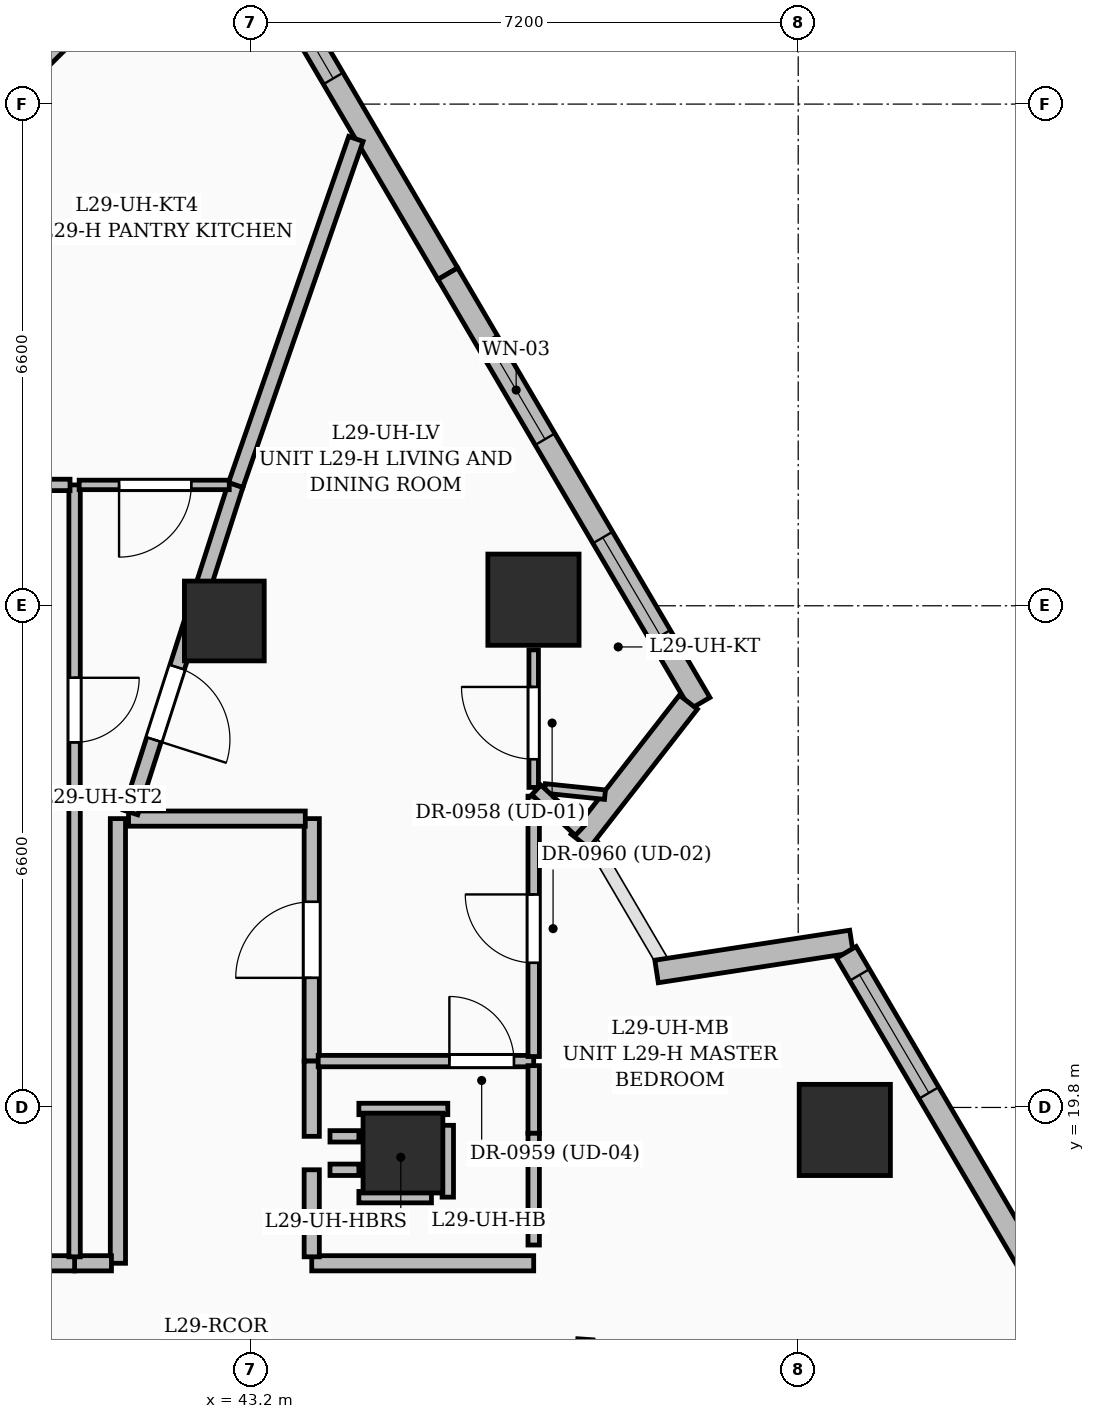
"""IFC4 building model, lengths in metres.
Left out: names, types, materials, properties, quantities, classifications, styles, units other than length and angle.
Written with IfcOpenShell. Run it as: python <this file> out.ifc"""

import sys

from ifc_helpers import new_model, si_unit, direction, frame, frame_2d, origin, origin_2d, place, context, subcontext, project, spatial, rectangle, extrude, element, fill, save


model = new_model("IFC4")
c1 = context("Model", 3, precision=1e-05, world=origin(), true_north=direction((0.0, 1.0)))
c2 = subcontext(c1, "Body", "Model", "MODEL_VIEW")
j1 = project(units=[si_unit("LENGTHUNIT", "METRE"), si_unit("PLANEANGLEUNIT", "RADIAN")], contexts=[c1])
p1 = place(None, origin())
s1 = spatial("IfcSite", under=j1, at=p1, CompositionType="ELEMENT")
p2 = place(p1, origin())
s2 = spatial("IfcBuilding", under=s1, at=p2, CompositionType="ELEMENT")
p3 = place(p2, frame((0.0, 0.0, 117.6)))
s3 = spatial("IfcBuildingStorey", under=s2, at=p3, CompositionType="ELEMENT", Elevation=117.6)
for number, where, z_axis, x_axis in (
    (1, (45.2, 19.2, 0.0), (0.0, 0.0, 1.0), (1.0, 0.0, 0.0)),
    (2, (42.85, 26.2, 0.0), (0.0, 0.0, 1.0), (1.0, 0.0, 0.0)),
):
    element("IfcColumn", number, at=place(p3, frame(where, z_axis=z_axis, x_axis=x_axis)), inside=s3, PredefinedType="COLUMN", context=c2, shape_type="SweptSolid", body=[
        extrude(rectangle(XDim=1.05, YDim=1.05, at=origin_2d()), origin(), (0.0, 0.0, 1.0), 3.6),
    ])
for number, where, z_axis, x_axis in (
    (3, (51.013, 19.504, 0.0), (0.0, 0.0, 1.0), (1.0, 0.0, 0.0)),
    (4, (46.917, 26.48, 0.0), (0.0, 0.0, 1.0), (1.0, 0.0, 0.0)),
):
    element("IfcColumn", number, at=place(p3, frame(where, z_axis=z_axis, x_axis=x_axis)), inside=s3, PredefinedType="COLUMN", context=c2, shape_type="SweptSolid", body=[
        extrude(rectangle(XDim=1.2, YDim=1.2, at=origin_2d()), origin(), (0.0, 0.0, 1.0), 3.6),
    ])
p4 = place(p3, frame((42.472, 36.42, 0.0), z_axis=(0.0, 0.0, 1.0), x_axis=(0.506315009763, -0.86234860172, 0.0)))
e5 = element("IfcWall", 5, at=p4, inside=s3, PredefinedType="SOLIDWALL", context=c2, shape_type="SweptSolid", body=[
    extrude(rectangle(XDim=6.553, YDim=0.3, at=frame_2d((3.277, 0.0))), origin(), (0.0, 0.0, 1.0), 3.35),
])
p5 = place(p4, frame((1.975, 0.0, 0.55)))
e6 = element("IfcOpeningElement", 6, at=p5, cuts=e5, PredefinedType="OPENING", context=c2, shape_type="SweptSolid", body=[
    extrude(rectangle(XDim=1.6, YDim=2.2, at=frame_2d((0.8, 1.1))), frame((0.0, 0.16, 0.0), z_axis=(0.0, -1.0, 0.0), x_axis=(1.0, 0.0, 0.0)), (0.0, 0.0, 1.0), 0.32),
])
p6 = place(p3, frame((45.791, 30.769, 0.0), z_axis=(0.0, 0.0, 1.0), x_axis=(0.506326446954, -0.862341886443, 0.0)))
e7 = element("IfcWall", 7, at=p6, inside=s3, PredefinedType="SOLIDWALL", context=c2, shape_type="SweptSolid", body=[
    extrude(rectangle(XDim=6.554, YDim=0.3, at=frame_2d((3.277, 0.0))), origin(), (0.0, 0.0, 1.0), 3.35),
])
p7 = place(p6, frame((1.025, 0.0, 0.6)))
e8 = element("IfcOpeningElement", 8, at=p7, cuts=e7, PredefinedType="OPENING", context=c2, shape_type="SweptSolid", body=[
    extrude(rectangle(XDim=1.5, YDim=2.1, at=frame_2d((0.75, 1.05))), frame((0.0, 0.16, 0.0), z_axis=(0.0, -1.0, 0.0), x_axis=(1.0, 0.0, 0.0)), (0.0, 0.0, 1.0), 0.32),
])
p8 = place(p6, frame((4.025, 0.0, 0.6)))
e9 = element("IfcOpeningElement", 9, at=p8, cuts=e7, PredefinedType="OPENING", context=c2, shape_type="SweptSolid", body=[
    extrude(rectangle(XDim=1.5, YDim=2.1, at=frame_2d((0.75, 1.05))), frame((0.0, 0.16, 0.0), z_axis=(0.0, -1.0, 0.0), x_axis=(1.0, 0.0, 0.0)), (0.0, 0.0, 1.0), 0.32),
])
p9 = place(p3, frame((48.955, 25.132, 0.0), z_axis=(0.0, 0.0, 1.0), x_axis=(-0.614326980446, -0.789051557946, 0.0)))
e10 = element("IfcWall", 10, at=p9, inside=s3, PredefinedType="SOLIDWALL", context=c2, shape_type="SweptSolid", body=[
    extrude(rectangle(XDim=2.318, YDim=0.3, at=frame_2d((1.159, 0.0))), origin(), (0.0, 0.0, 1.0), 2.575),
])
p10 = place(p3, frame((48.537, 21.589, 0.0), z_axis=(0.0, 0.0, 1.0), x_axis=(0.988351014823, 0.152191561848, 0.0)))
e11 = element("IfcWall", 11, at=p10, inside=s3, PredefinedType="SOLIDWALL", context=c2, shape_type="SweptSolid", body=[
    extrude(rectangle(XDim=2.594, YDim=0.3, at=frame_2d((1.297, 0.0))), origin(), (0.0, 0.0, 1.0), 2.575),
])
p11 = place(p3, frame((51.033, 21.841, 0.0), z_axis=(0.0, 0.0, 1.0), x_axis=(0.506317595085, -0.862347083782, 0.0)))
e12 = element("IfcWall", 12, at=p11, inside=s3, PredefinedType="SOLIDWALL", context=c2, shape_type="SweptSolid", body=[
    extrude(rectangle(XDim=6.274, YDim=0.3, at=frame_2d((3.137, 0.0))), origin(), (0.0, 0.0, 1.0), 3.35),
])
p12 = place(p11, frame((0.345, 0.0, 0.6)))
e13 = element("IfcOpeningElement", 13, at=p12, cuts=e12, PredefinedType="OPENING", context=c2, shape_type="SweptSolid", body=[
    extrude(rectangle(XDim=1.8, YDim=2.1, at=frame_2d((0.9, 1.05))), frame((0.0, 0.16, 0.0), z_axis=(0.0, -1.0, 0.0), x_axis=(1.0, 0.0, 0.0)), (0.0, 0.0, 1.0), 0.32),
])
p13 = place(p3, frame((47.425, 14.2, 0.0), z_axis=(0.0, 0.0, 1.0), x_axis=(0.068484119878, 0.997652206595, 0.0)))
e14 = element("IfcWall", 14, at=p13, inside=s3, PredefinedType="PARTITIONING", context=c2, shape_type="SweptSolid", body=[
    extrude(rectangle(XDim=2.556, YDim=0.2, at=frame_2d((1.278, 0.0))), origin(), (0.0, 0.0, 1.0), 2.372),
])
p14 = place(p3, frame((44.0, 20.41, 0.0), z_axis=(0.0, 0.0, 1.0), x_axis=(0.0, 1.0, 0.0)))
e15 = element("IfcWall", 15, at=p14, inside=s3, PredefinedType="PARTITIONING", context=c2, shape_type="SweptSolid", body=[
    extrude(rectangle(XDim=3.19, YDim=0.2, at=frame_2d((1.595, 0.0))), origin(), (0.0, 0.0, 1.0), 2.436),
])
p15 = place(p14, frame((1.095, 0.0, 0.0)))
e16 = element("IfcOpeningElement", 16, at=p15, cuts=e15, PredefinedType="OPENING", context=c2, shape_type="SweptSolid", body=[
    extrude(rectangle(XDim=1.0, YDim=2.2, at=frame_2d((0.5, 1.1))), frame((0.0, 0.11, 0.0), z_axis=(0.0, -1.0, 0.0), x_axis=(1.0, 0.0, 0.0)), (0.0, 0.0, 1.0), 0.22),
])
p16 = place(p3, frame((43.915, 23.6, 0.0), z_axis=(0.0, 0.0, 1.0), x_axis=(-1.0, 0.0, 0.0)))
e17 = element("IfcWall", 17, at=p16, inside=s3, PredefinedType="PARTITIONING", context=c2, shape_type="SweptSolid", body=[
    extrude(rectangle(XDim=2.325, YDim=0.2, at=frame_2d((1.163, 0.0))), origin(), (0.0, 0.0, 1.0), 2.436),
])
p17 = place(p3, frame((46.92, 17.75, 0.0), z_axis=(0.0, 0.0, 1.0), x_axis=(-1.0, 0.0, 0.0)))
e18 = element("IfcWall", 18, at=p17, inside=s3, PredefinedType="PARTITIONING", context=c2, shape_type="SweptSolid", body=[
    extrude(rectangle(XDim=2.92, YDim=0.2, at=frame_2d((1.46, 0.0))), origin(), (0.0, 0.0, 1.0), 2.436),
])
p18 = place(p3, frame((44.0, 17.835, 0.0), z_axis=(0.0, 0.0, 1.0), x_axis=(0.0, 1.0, 0.0)))
e19 = element("IfcWall", 19, at=p18, inside=s3, PredefinedType="PARTITIONING", context=c2, shape_type="SweptSolid", body=[
    extrude(rectangle(XDim=1.145, YDim=0.2, at=frame_2d((0.573, 0.0))), origin(), (0.0, 0.0, 1.0), 3.35),
])
p19 = place(p3, frame((44.0, 19.42, 0.0), z_axis=(0.0, 0.0, 1.0), x_axis=(0.0, 1.0, 0.0)))
e20 = element("IfcWall", 20, at=p19, inside=s3, PredefinedType="PARTITIONING", context=c2, shape_type="SweptSolid", body=[
    extrude(rectangle(XDim=0.99, YDim=0.2, at=frame_2d((0.495, 0.0))), origin(), (0.0, 0.0, 1.0), 3.35),
])
p20 = place(p3, frame((41.45, 23.6, 0.0), z_axis=(0.0, 0.0, 1.0), x_axis=(0.0, -1.0, 0.0)))
e21 = element("IfcWall", 21, at=p20, inside=s3, PredefinedType="PARTITIONING", context=c2, shape_type="SweptSolid", body=[
    extrude(rectangle(XDim=5.85, YDim=0.2, at=frame_2d((2.925, 0.0))), origin(), (0.0, 0.0, 1.0), 2.853),
])
p21 = place(p3, frame((41.365, 17.75, 0.0), z_axis=(0.0, 0.0, 1.0), x_axis=(-1.0, 0.0, 0.0)))
e22 = element("IfcWall", 22, at=p21, inside=s3, PredefinedType="PARTITIONING", context=c2, shape_type="SweptSolid", body=[
    extrude(rectangle(XDim=0.485, YDim=0.2, at=frame_2d((0.243, 0.0))), origin(), (0.0, 0.0, 1.0), 3.35),
])
p22 = place(p3, frame((40.88, 17.75, 0.0), z_axis=(0.0, 0.0, 1.0), x_axis=(-1.0, 0.0, 0.0)))
e23 = element("IfcWall", 23, at=p22, inside=s3, PredefinedType="PARTITIONING", context=c2, shape_type="SweptSolid", body=[
    extrude(rectangle(XDim=0.6, YDim=0.2, at=frame_2d((0.3, 0.0))), origin(), (0.0, 0.0, 1.0), 3.35),
])
p23 = place(p3, frame((44.085, 20.41, 0.0), z_axis=(0.0, 0.0, 1.0), x_axis=(1.0, 0.0, 0.0)))
e24 = element("IfcWall", 24, at=p23, inside=s3, PredefinedType="PARTITIONING", context=c2, shape_type="SweptSolid", body=[
    extrude(rectangle(XDim=2.835, YDim=0.15, at=frame_2d((1.417, 0.0))), origin(), (0.0, 0.0, 1.0), 2.372),
])
p24 = place(p23, frame((1.726, 0.0, 0.0)))
e25 = element("IfcOpeningElement", 25, at=p24, cuts=e24, PredefinedType="OPENING", context=c2, shape_type="SweptSolid", body=[
    extrude(rectangle(XDim=0.85, YDim=2.1, at=frame_2d((0.425, 1.05))), frame((0.0, 0.085, 0.0), z_axis=(0.0, -1.0, 0.0), x_axis=(1.0, 0.0, 0.0)), (0.0, 0.0, 1.0), 0.17),
])
p25 = place(p3, frame((46.92, 24.01, 0.0), z_axis=(0.0, 0.0, 1.0), x_axis=(0.0, 1.0, 0.0)))
e26 = element("IfcWall", 26, at=p25, inside=s3, PredefinedType="PARTITIONING", context=c2, shape_type="SweptSolid", body=[
    extrude(rectangle(XDim=1.81, YDim=0.125, at=frame_2d((0.905, 0.0))), origin(), (0.0, 0.0, 1.0), 2.372),
])
p26 = place(p25, frame((0.372, 0.0, 0.0)))
e27 = element("IfcOpeningElement", 27, at=p26, cuts=e26, PredefinedType="OPENING", context=c2, shape_type="SweptSolid", body=[
    extrude(rectangle(XDim=0.95, YDim=2.2, at=frame_2d((0.475, 1.1))), frame((0.0, 0.072, 0.0), z_axis=(0.0, -1.0, 0.0), x_axis=(1.0, 0.0, 0.0)), (0.0, 0.0, 1.0), 0.145),
])
p27 = place(p3, frame((46.92, 20.47, 0.0), z_axis=(0.0, 0.0, 1.0), x_axis=(0.0, 1.0, 0.0)))
e28 = element("IfcWall", 28, at=p27, inside=s3, PredefinedType="PARTITIONING", context=c2, shape_type="SweptSolid", body=[
    extrude(rectangle(XDim=3.425, YDim=0.15, at=frame_2d((1.712, 0.0))), origin(), (0.0, 0.0, 1.0), 2.771),
])
p28 = place(p27, frame((1.232, 0.0, 0.0)))
e29 = element("IfcOpeningElement", 29, at=p28, cuts=e28, PredefinedType="OPENING", context=c2, shape_type="SweptSolid", body=[
    extrude(rectangle(XDim=0.9, YDim=2.15, at=frame_2d((0.45, 1.075))), frame((0.0, 0.085, 0.0), z_axis=(0.0, -1.0, 0.0), x_axis=(1.0, 0.0, 0.0)), (0.0, 0.0, 1.0), 0.17),
])
p29 = place(p3, frame((43.0, 27.99, 0.0), z_axis=(0.0, 0.0, 1.0), x_axis=(-0.305803129518, -0.95209476733, 0.0)))
e30 = element("IfcWall", 30, at=p29, inside=s3, PredefinedType="PARTITIONING", context=c2, shape_type="SweptSolid", body=[
    extrude(rectangle(XDim=4.526, YDim=0.2, at=frame_2d((2.263, 0.0))), origin(), (0.0, 0.0, 1.0), 2.372),
])
p30 = place(p29, frame((2.519, 0.0, 0.0)))
e31 = element("IfcOpeningElement", 31, at=p30, cuts=e30, PredefinedType="OPENING", context=c2, shape_type="SweptSolid", body=[
    extrude(rectangle(XDim=1.0, YDim=2.2, at=frame_2d((0.5, 1.1))), frame((0.0, 0.11, 0.0), z_axis=(0.0, -1.0, 0.0), x_axis=(1.0, 0.0, 0.0)), (0.0, 0.0, 1.0), 0.22),
])
p31 = place(p3, frame((44.581, 32.542, 0.0), z_axis=(0.0, 0.0, 1.0), x_axis=(-0.328103998337, -0.944641607318, 0.0)))
e32 = element("IfcWall", 32, at=p31, inside=s3, PredefinedType="PARTITIONING", context=c2, shape_type="SweptSolid", body=[
    extrude(rectangle(XDim=4.819, YDim=0.2, at=frame_2d((2.409, 0.0))), origin(), (0.0, 0.0, 1.0), 2.57),
])
p32 = place(p3, frame((46.92, 19.46, 0.0), z_axis=(0.0, 0.0, 1.0), x_axis=(0.0, 1.0, 0.0)))
e33 = element("IfcWall", 33, at=p32, inside=s3, PredefinedType="PARTITIONING", context=c2, shape_type="SweptSolid", body=[
    extrude(rectangle(XDim=0.89, YDim=0.15, at=frame_2d((0.445, 0.0))), origin(), (0.0, 0.0, 1.0), 3.35),
])
p33 = place(p3, frame((47.067, 23.997, 0.0), z_axis=(0.0, 0.0, 1.0), x_axis=(0.99466575773, -0.103150523024, 0.0)))
e34 = element("IfcWall", 34, at=p33, inside=s3, PredefinedType="PARTITIONING", context=c2, shape_type="SweptSolid", body=[
    extrude(rectangle(XDim=0.795, YDim=0.125, at=frame_2d((0.397, 0.0))), origin(), (0.0, 0.0, 1.0), 3.35),
])
p34 = place(p3, frame((40.88, 27.99, 0.0), z_axis=(0.0, 0.0, 1.0), x_axis=(0.0, -1.0, 0.0)))
e35 = element("IfcWall", 35, at=p34, inside=s3, PredefinedType="PARTITIONING", context=c2, shape_type="SweptSolid", body=[
    extrude(rectangle(XDim=10.155, YDim=0.15, at=frame_2d((5.078, 0.0))), origin(), (0.0, 0.0, 1.0), 2.436),
])
p35 = place(p34, frame((2.537, 0.0, 0.0)))
e36 = element("IfcOpeningElement", 36, at=p35, cuts=e35, PredefinedType="OPENING", context=c2, shape_type="SweptSolid", body=[
    extrude(rectangle(XDim=0.85, YDim=2.1, at=frame_2d((0.425, 1.05))), frame((0.0, 0.085, 0.0), z_axis=(0.0, -1.0, 0.0), x_axis=(1.0, 0.0, 0.0)), (0.0, 0.0, 1.0), 0.17),
])
p36 = place(p3, frame((42.915, 27.99, 0.0), z_axis=(0.0, 0.0, 1.0), x_axis=(-1.0, 0.0, 0.0)))
e37 = element("IfcWall", 37, at=p36, inside=s3, PredefinedType="PARTITIONING", context=c2, shape_type="SweptSolid", body=[
    extrude(rectangle(XDim=1.975, YDim=0.125, at=frame_2d((0.988, 0.0))), origin(), (0.0, 0.0, 1.0), 2.372),
])
p37 = place(p36, frame((0.5, 0.0, 0.0)))
e38 = element("IfcOpeningElement", 38, at=p37, cuts=e37, PredefinedType="OPENING", context=c2, shape_type="SweptSolid", body=[
    extrude(rectangle(XDim=0.95, YDim=2.2, at=frame_2d((0.475, 1.1))), frame((0.0, 0.072, 0.0), z_axis=(0.0, -1.0, 0.0), x_axis=(1.0, 0.0, 0.0)), (0.0, 0.0, 1.0), 0.145),
])
p38 = place(p3, frame((40.82, 27.99, 0.0), z_axis=(0.0, 0.0, 1.0), x_axis=(-1.0, 0.0, 0.0)))
e39 = element("IfcWall", 39, at=p38, inside=s3, PredefinedType="PARTITIONING", context=c2, shape_type="SweptSolid", body=[
    extrude(rectangle(XDim=2.675, YDim=0.15, at=frame_2d((1.337, 0.0))), origin(), (0.0, 0.0, 1.0), 3.35),
])
p39 = place(p3, frame((41.684, 34.784, 0.0), z_axis=(0.0, 0.0, 1.0), x_axis=(-0.707106781187, -0.707106781187, 0.0)))
e40 = element("IfcWall", 40, at=p39, inside=s3, PredefinedType="PARTITIONING", context=c2, shape_type="SweptSolid", body=[
    extrude(rectangle(XDim=5.292, YDim=0.2, at=frame_2d((2.646, 0.0))), origin(), (0.0, 0.0, 1.0), 2.771),
])
p40 = place(p3, frame((47.528, 23.443, 0.0), z_axis=(0.0, 0.0, 1.0), x_axis=(-0.731583247314, 0.681752119358, 0.0)))
e41 = element("IfcWall", 41, at=p40, inside=s3, PredefinedType="PARTITIONING", context=c2, shape_type="SweptSolid", body=[
    extrude(rectangle(XDim=0.784, YDim=0.175, at=frame_2d((0.392, 0.0))), origin(), (0.0, 0.0, 1.0), 3.35),
])
p41 = place(p3, frame((44.24, 19.42, 0.0), z_axis=(0.0, 0.0, 1.0), x_axis=(1.0, 0.0, 0.0)))
e42 = element("IfcWall", 42, at=p41, inside=s3, PredefinedType="PARTITIONING", context=c2, shape_type="SweptSolid", body=[
    extrude(rectangle(XDim=0.38, YDim=0.15, at=frame_2d((0.19, 0.0))), origin(), (0.0, 0.0, 1.0), 3.35),
])
p42 = place(p3, frame((44.62, 19.78, 0.0), z_axis=(0.0, 0.0, 1.0), x_axis=(1.0, 0.0, 0.0)))
e43 = element("IfcWall", 43, at=p42, inside=s3, PredefinedType="PARTITIONING", context=c2, shape_type="SweptSolid", body=[
    extrude(rectangle(XDim=1.17, YDim=0.15, at=frame_2d((0.585, 0.0))), origin(), (0.0, 0.0, 1.0), 2.372),
])
p43 = place(p3, frame((45.79, 19.565, 0.0), z_axis=(0.0, 0.0, 1.0), x_axis=(0.0, -1.0, 0.0)))
e44 = element("IfcWall", 44, at=p43, inside=s3, PredefinedType="PARTITIONING", context=c2, shape_type="SweptSolid", body=[
    extrude(rectangle(XDim=0.945, YDim=0.15, at=frame_2d((0.472, 0.0))), origin(), (0.0, 0.0, 1.0), 3.35),
])
p44 = place(p3, frame((45.575, 18.62, 0.0), z_axis=(0.0, 0.0, 1.0), x_axis=(-1.0, 0.0, 0.0)))
e45 = element("IfcWall", 45, at=p44, inside=s3, PredefinedType="PARTITIONING", context=c2, shape_type="SweptSolid", body=[
    extrude(rectangle(XDim=0.955, YDim=0.15, at=frame_2d((0.478, 0.0))), origin(), (0.0, 0.0, 1.0), 2.436),
])
p45 = place(p3, frame((44.62, 18.98, 0.0), z_axis=(0.0, 0.0, 1.0), x_axis=(-1.0, 0.0, 0.0)))
e46 = element("IfcWall", 46, at=p45, inside=s3, PredefinedType="PARTITIONING", context=c2, shape_type="SweptSolid", body=[
    extrude(rectangle(XDim=0.38, YDim=0.15, at=frame_2d((0.19, 0.0))), origin(), (0.0, 0.0, 1.0), 3.35),
])
p46 = place(p3, frame((46.92, 17.99, 0.0), z_axis=(0.0, 0.0, 1.0), x_axis=(0.0, 1.0, 0.0)))
e47 = element("IfcWall", 47, at=p46, inside=s3, PredefinedType="PARTITIONING", context=c2, shape_type="SweptSolid", body=[
    extrude(rectangle(XDim=1.47, YDim=0.15, at=frame_2d((0.735, 0.0))), origin(), (0.0, 0.0, 1.0), 2.771),
])
p47 = place(p5, origin())
e48 = element("IfcWindow", 48, at=p47, inside=s3, PartitioningType="SINGLE_PANEL", PredefinedType="WINDOW", context=c2, shape_type="SweptSolid", body=[
    extrude(rectangle(XDim=1.6, YDim=2.2, at=frame_2d((0.8, 1.1))), frame((0.0, 0.03, 0.0), z_axis=(0.0, -1.0, 0.0), x_axis=(1.0, 0.0, 0.0)), (0.0, 0.0, 1.0), 0.06),
])
fill(e6, e48)
p48 = place(p7, origin())
e49 = element("IfcWindow", 49, at=p48, inside=s3, PartitioningType="SINGLE_PANEL", PredefinedType="WINDOW", context=c2, shape_type="SweptSolid", body=[
    extrude(rectangle(XDim=1.5, YDim=2.1, at=frame_2d((0.75, 1.05))), frame((0.0, 0.03, 0.0), z_axis=(0.0, -1.0, 0.0), x_axis=(1.0, 0.0, 0.0)), (0.0, 0.0, 1.0), 0.06),
])
fill(e8, e49)
p49 = place(p8, origin())
e50 = element("IfcWindow", 50, at=p49, inside=s3, PartitioningType="SINGLE_PANEL", PredefinedType="WINDOW", context=c2, shape_type="SweptSolid", body=[
    extrude(rectangle(XDim=1.5, YDim=2.1, at=frame_2d((0.75, 1.05))), frame((0.0, 0.03, 0.0), z_axis=(0.0, -1.0, 0.0), x_axis=(1.0, 0.0, 0.0)), (0.0, 0.0, 1.0), 0.06),
])
fill(e9, e50)
p50 = place(p12, origin())
e51 = element("IfcWindow", 51, at=p50, inside=s3, PartitioningType="SINGLE_PANEL", PredefinedType="WINDOW", context=c2, shape_type="SweptSolid", body=[
    extrude(rectangle(XDim=1.8, YDim=2.1, at=frame_2d((0.9, 1.05))), frame((0.0, 0.03, 0.0), z_axis=(0.0, -1.0, 0.0), x_axis=(1.0, 0.0, 0.0)), (0.0, 0.0, 1.0), 0.06),
])
fill(e13, e51)
p51 = place(p15, origin())
e52 = element("IfcDoor", 52, at=p51, inside=s3, OperationType="SINGLE_SWING_LEFT", PredefinedType="DOOR", context=c2, shape_type="SweptSolid", body=[
    extrude(rectangle(XDim=1.0, YDim=2.2, at=frame_2d((0.5, 1.1))), frame((0.0, 0.025, 0.0), z_axis=(0.0, -1.0, 0.0), x_axis=(1.0, 0.0, 0.0)), (0.0, 0.0, 1.0), 0.05),
])
fill(e16, e52)
p52 = place(p26, origin())
e53 = element("IfcDoor", 53, at=p52, inside=s3, OperationType="SINGLE_SWING_RIGHT", PredefinedType="DOOR", context=c2, shape_type="SweptSolid", body=[
    extrude(rectangle(XDim=0.95, YDim=2.2, at=frame_2d((0.475, 1.1))), frame((0.0, 0.025, 0.0), z_axis=(0.0, -1.0, 0.0), x_axis=(1.0, 0.0, 0.0)), (0.0, 0.0, 1.0), 0.05),
])
fill(e27, e53)
p53 = place(p24, origin())
e54 = element("IfcDoor", 54, at=p53, inside=s3, OperationType="SINGLE_SWING_LEFT", PredefinedType="DOOR", context=c2, shape_type="SweptSolid", body=[
    extrude(rectangle(XDim=0.85, YDim=2.1, at=frame_2d((0.425, 1.05))), frame((0.0, 0.025, 0.0), z_axis=(0.0, -1.0, 0.0), x_axis=(1.0, 0.0, 0.0)), (0.0, 0.0, 1.0), 0.05),
])
fill(e25, e54)
p54 = place(p28, origin())
e55 = element("IfcDoor", 55, at=p54, inside=s3, OperationType="SINGLE_SWING_RIGHT", PredefinedType="DOOR", context=c2, shape_type="SweptSolid", body=[
    extrude(rectangle(XDim=0.9, YDim=2.15, at=frame_2d((0.45, 1.075))), frame((0.0, 0.025, 0.0), z_axis=(0.0, -1.0, 0.0), x_axis=(1.0, 0.0, 0.0)), (0.0, 0.0, 1.0), 0.05),
])
fill(e29, e55)
p55 = place(p37, origin())
e56 = element("IfcDoor", 56, at=p55, inside=s3, OperationType="SINGLE_SWING_RIGHT", PredefinedType="DOOR", context=c2, shape_type="SweptSolid", body=[
    extrude(rectangle(XDim=0.95, YDim=2.2, at=frame_2d((0.475, 1.1))), frame((0.0, 0.025, 0.0), z_axis=(0.0, -1.0, 0.0), x_axis=(1.0, 0.0, 0.0)), (0.0, 0.0, 1.0), 0.05),
])
fill(e38, e56)
p56 = place(p35, origin())
e57 = element("IfcDoor", 57, at=p56, inside=s3, OperationType="SINGLE_SWING_LEFT", PredefinedType="DOOR", context=c2, shape_type="SweptSolid", body=[
    extrude(rectangle(XDim=0.85, YDim=2.1, at=frame_2d((0.425, 1.05))), frame((0.0, 0.025, 0.0), z_axis=(0.0, -1.0, 0.0), x_axis=(1.0, 0.0, 0.0)), (0.0, 0.0, 1.0), 0.05),
])
fill(e36, e57)
p57 = place(p30, origin())
e58 = element("IfcDoor", 58, at=p57, inside=s3, OperationType="SINGLE_SWING_RIGHT", PredefinedType="DOOR", context=c2, shape_type="SweptSolid", body=[
    extrude(rectangle(XDim=1.0, YDim=2.2, at=frame_2d((0.5, 1.1))), frame((0.0, 0.025, 0.0), z_axis=(0.0, -1.0, 0.0), x_axis=(1.0, 0.0, 0.0)), (0.0, 0.0, 1.0), 0.05),
])
fill(e31, e58)
save(model, sys.argv[1])
